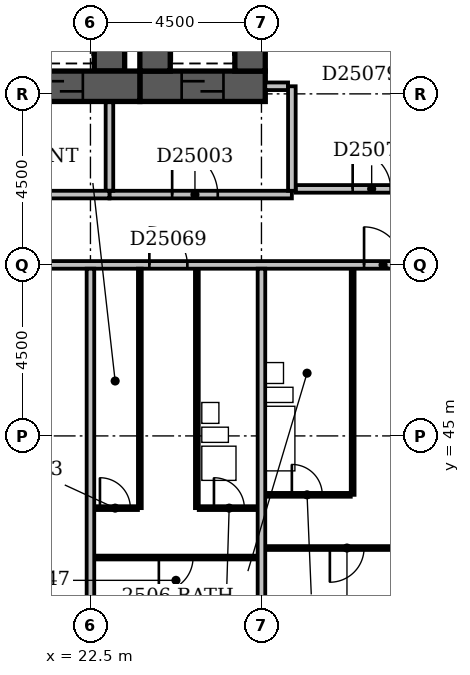
"""IFC4 building model, lengths in metres.
Left out: names, types, materials, properties, quantities, classifications, styles, units other than length and angle.
Written with IfcOpenShell. Run it as: python <this file> out.ifc"""

import sys

from ifc_helpers import new_model, si_unit, direction, frame, frame_2d, origin, place, context, subcontext, project, spatial, rectangle, extrude, element, fill, save


model = new_model("IFC4")
c1 = context("Model", 3, precision=1e-05, world=origin(), true_north=direction((0.0, 1.0)))
c2 = subcontext(c1, "Body", "Model", "MODEL_VIEW")
j1 = project(units=[si_unit("LENGTHUNIT", "METRE"), si_unit("PLANEANGLEUNIT", "RADIAN")], contexts=[c1])
p1 = place(None, origin())
s1 = spatial("IfcSite", under=j1, at=p1, CompositionType="ELEMENT")
p2 = place(p1, origin())
s2 = spatial("IfcBuilding", under=s1, at=p2, CompositionType="ELEMENT")
p3 = place(p2, frame((0.0, 0.0, 101.0)))
s3 = spatial("IfcBuildingStorey", under=s2, at=p3, CompositionType="ELEMENT", Elevation=101.0)
p4 = place(p3, frame((7.35, 54.2, -0.3), z_axis=(0.0, 0.0, 1.0), x_axis=(1.0, 0.0, 0.0)))
e1 = element("IfcWall", 1, at=p4, inside=s3, PredefinedType="SHEAR", context=c2, shape_type="SweptSolid", body=[
    extrude(rectangle(XDim=16.45, YDim=0.8, at=frame_2d((8.225, 0.0))), origin(), (0.0, 0.0, 1.0), 3.6),
])
p5 = place(p4, frame((1.35, 0.0, 0.3)))
e2 = element("IfcOpeningElement", 2, at=p5, cuts=e1, PredefinedType="OPENING", context=c2, shape_type="SweptSolid", body=[
    extrude(rectangle(XDim=1.1, YDim=2.1, at=frame_2d((0.55, 1.05))), frame((0.0, 0.412, 0.0), z_axis=(0.0, -1.0, 0.0), x_axis=(1.0, 0.0, 0.0)), (0.0, 0.0, 1.0), 0.824),
])
p6 = place(p4, frame((3.85, 0.0, 0.3)))
e3 = element("IfcOpeningElement", 3, at=p6, cuts=e1, PredefinedType="OPENING", context=c2, shape_type="SweptSolid", body=[
    extrude(rectangle(XDim=1.1, YDim=2.1, at=frame_2d((0.55, 1.05))), frame((0.0, 0.412, 0.0), z_axis=(0.0, -1.0, 0.0), x_axis=(1.0, 0.0, 0.0)), (0.0, 0.0, 1.0), 0.824),
])
p7 = place(p4, frame((6.35, 0.0, 0.3)))
e4 = element("IfcOpeningElement", 4, at=p7, cuts=e1, PredefinedType="OPENING", context=c2, shape_type="SweptSolid", body=[
    extrude(rectangle(XDim=1.1, YDim=2.1, at=frame_2d((0.55, 1.05))), frame((0.0, 0.412, 0.0), z_axis=(0.0, -1.0, 0.0), x_axis=(1.0, 0.0, 0.0)), (0.0, 0.0, 1.0), 0.824),
])
p8 = place(p4, frame((8.85, 0.0, 0.3)))
e5 = element("IfcOpeningElement", 5, at=p8, cuts=e1, PredefinedType="OPENING", context=c2, shape_type="SweptSolid", body=[
    extrude(rectangle(XDim=1.1, YDim=2.1, at=frame_2d((0.55, 1.05))), frame((0.0, 0.412, 0.0), z_axis=(0.0, -1.0, 0.0), x_axis=(1.0, 0.0, 0.0)), (0.0, 0.0, 1.0), 0.824),
])
p9 = place(p4, frame((11.35, 0.0, 0.3)))
e6 = element("IfcOpeningElement", 6, at=p9, cuts=e1, PredefinedType="OPENING", context=c2, shape_type="SweptSolid", body=[
    extrude(rectangle(XDim=1.1, YDim=2.1, at=frame_2d((0.55, 1.05))), frame((0.0, 0.412, 0.0), z_axis=(0.0, -1.0, 0.0), x_axis=(1.0, 0.0, 0.0)), (0.0, 0.0, 1.0), 0.824),
])
p10 = place(p4, frame((13.85, 0.0, 0.3)))
e7 = element("IfcOpeningElement", 7, at=p10, cuts=e1, PredefinedType="OPENING", context=c2, shape_type="SweptSolid", body=[
    extrude(rectangle(XDim=1.1, YDim=2.1, at=frame_2d((0.55, 1.05))), frame((0.0, 0.412, 0.0), z_axis=(0.0, -1.0, 0.0), x_axis=(1.0, 0.0, 0.0)), (0.0, 0.0, 1.0), 0.824),
])
p11 = place(p3, frame((23.0, 54.6, -0.3), z_axis=(0.0, 0.0, 1.0), x_axis=(0.0, 1.0, 0.0)))
e8 = element("IfcWall", 8, at=p11, inside=s3, PredefinedType="SHEAR", context=c2, shape_type="SweptSolid", body=[
    extrude(rectangle(XDim=3.0, YDim=0.8, at=frame_2d((1.5, 0.0))), origin(), (0.0, 0.0, 1.0), 3.6),
])
p12 = place(p3, frame((23.8, 54.2, -0.3), z_axis=(0.0, 0.0, 1.0), x_axis=(1.0, 0.0, 0.0)))
e9 = element("IfcWall", 9, at=p12, inside=s3, PredefinedType="SHEAR", context=c2, shape_type="SweptSolid", body=[
    extrude(rectangle(XDim=3.3, YDim=0.8, at=frame_2d((1.65, 0.0))), origin(), (0.0, 0.0, 1.0), 3.6),
])
p13 = place(p12, frame((1.1, 0.0, 0.3)))
e10 = element("IfcOpeningElement", 10, at=p13, cuts=e9, PredefinedType="OPENING", context=c2, shape_type="SweptSolid", body=[
    extrude(rectangle(XDim=1.1, YDim=2.1, at=frame_2d((0.55, 1.05))), frame((0.0, 0.412, 0.0), z_axis=(0.0, -1.0, 0.0), x_axis=(1.0, 0.0, 0.0)), (0.0, 0.0, 1.0), 0.824),
])
for number, where, z_axis, x_axis in (
    (11, (24.2, 54.6, -0.3), (0.0, 0.0, 1.0), (0.0, 1.0, 0.0)),
    (12, (26.7, 54.6, -0.3), (0.0, 0.0, 1.0), (0.0, 1.0, 0.0)),
):
    element("IfcWall", number, at=place(p3, frame(where, z_axis=z_axis, x_axis=x_axis)), inside=s3, PredefinedType="SHEAR", context=c2, shape_type="SweptSolid", body=[
        extrude(rectangle(XDim=3.0, YDim=0.8, at=frame_2d((1.5, 0.0))), origin(), (0.0, 0.0, 1.0), 3.6),
    ])
p14 = place(p3, frame((8.0, 51.35, 0.0), z_axis=(0.0, 0.0, 1.0), x_axis=(1.0, 0.0, 0.0)))
e13 = element("IfcWall", 13, at=p14, inside=s3, PredefinedType="PARTITIONING", context=c2, shape_type="SweptSolid", body=[
    extrude(rectangle(XDim=15.0, YDim=0.2, at=frame_2d((7.5, 0.0))), origin(), (0.0, 0.0, 1.0), 3.3),
])
p15 = place(p14, frame((3.4, 0.0, 0.0)))
e14 = element("IfcOpeningElement", 14, at=p15, cuts=e13, PredefinedType="OPENING", context=c2, shape_type="SweptSolid", body=[
    extrude(rectangle(XDim=1.2, YDim=2.1, at=frame_2d((0.6, 1.05))), frame((0.0, 0.112, 0.0), z_axis=(0.0, -1.0, 0.0), x_axis=(1.0, 0.0, 0.0)), (0.0, 0.0, 1.0), 0.224),
])
p16 = place(p14, frame((9.4, 0.0, 0.0)))
e15 = element("IfcOpeningElement", 15, at=p16, cuts=e13, PredefinedType="OPENING", context=c2, shape_type="SweptSolid", body=[
    extrude(rectangle(XDim=1.2, YDim=2.1, at=frame_2d((0.6, 1.05))), frame((0.0, 0.112, 0.0), z_axis=(0.0, -1.0, 0.0), x_axis=(1.0, 0.0, 0.0)), (0.0, 0.0, 1.0), 0.224),
])
p17 = place(p3, frame((23.0, 51.45, 0.0), z_axis=(0.0, 0.0, 1.0), x_axis=(0.0, 1.0, 0.0)))
e16 = element("IfcWall", 16, at=p17, inside=s3, PredefinedType="PARTITIONING", context=c2, shape_type="SweptSolid", body=[
    extrude(rectangle(XDim=2.33, YDim=0.2, at=frame_2d((1.165, 0.0))), origin(), (0.0, 0.0, 1.0), 3.3),
])
p18 = place(p3, frame((23.0, 51.35, 0.0), z_axis=(0.0, 0.0, 1.0), x_axis=(1.0, 0.0, 0.0)))
e17 = element("IfcWall", 17, at=p18, inside=s3, PredefinedType="PARTITIONING", context=c2, shape_type="SweptSolid", body=[
    extrude(rectangle(XDim=4.8, YDim=0.2, at=frame_2d((2.4, 0.0))), origin(), (0.0, 0.0, 1.0), 3.3),
])
p19 = place(p18, frame((1.65, 0.0, 0.0)))
e18 = element("IfcOpeningElement", 18, at=p19, cuts=e17, PredefinedType="OPENING", context=c2, shape_type="SweptSolid", body=[
    extrude(rectangle(XDim=1.2, YDim=2.1, at=frame_2d((0.6, 1.05))), frame((0.0, 0.112, 0.0), z_axis=(0.0, -1.0, 0.0), x_axis=(1.0, 0.0, 0.0)), (0.0, 0.0, 1.0), 0.224),
])
p20 = place(p3, frame((27.8, 51.45, 0.0), z_axis=(0.0, 0.0, 1.0), x_axis=(0.0, 1.0, 0.0)))
e19 = element("IfcWall", 19, at=p20, inside=s3, PredefinedType="PARTITIONING", context=c2, shape_type="SweptSolid", body=[
    extrude(rectangle(XDim=2.75, YDim=0.2, at=frame_2d((1.375, 0.0))), origin(), (0.0, 0.0, 1.0), 3.3),
])
p21 = place(p3, frame((27.1, 54.2, 0.0), z_axis=(0.0, 0.0, 1.0), x_axis=(1.0, 0.0, 0.0)))
e20 = element("IfcWall", 20, at=p21, inside=s3, PredefinedType="PARTITIONING", context=c2, shape_type="SweptSolid", body=[
    extrude(rectangle(XDim=0.6, YDim=0.2, at=frame_2d((0.3, 0.0))), origin(), (0.0, 0.0, 1.0), 3.3),
])
p22 = place(p3, frame((22.5, 36.6, 0.0), z_axis=(0.0, 0.0, 1.0), x_axis=(0.0, 1.0, 0.0)))
e21 = element("IfcWall", 21, at=p22, inside=s3, PredefinedType="PARTITIONING", context=c2, shape_type="SweptSolid", body=[
    extrude(rectangle(XDim=12.8, YDim=0.2, at=frame_2d((6.4, 0.0))), origin(), (0.0, 0.0, 1.0), 3.3),
])
p23 = place(p3, frame((27.0, 36.6, 0.0), z_axis=(0.0, 0.0, 1.0), x_axis=(0.0, 1.0, 0.0)))
e22 = element("IfcWall", 22, at=p23, inside=s3, PredefinedType="PARTITIONING", context=c2, shape_type="SweptSolid", body=[
    extrude(rectangle(XDim=12.8, YDim=0.2, at=frame_2d((6.4, 0.0))), origin(), (0.0, 0.0, 1.0), 2.6),
])
p24 = place(p3, frame((22.6, 41.8, 0.0), z_axis=(0.0, 0.0, 1.0), x_axis=(1.0, 0.0, 0.0)))
e23 = element("IfcWall", 23, at=p24, inside=s3, PredefinedType="PARTITIONING", context=c2, shape_type="SweptSolid", body=[
    extrude(rectangle(XDim=4.3, YDim=0.1, at=frame_2d((2.15, 0.0))), origin(), (0.0, 0.0, 1.0), 3.3),
])
p25 = place(p24, frame((1.7, 0.0, 0.0)))
e24 = element("IfcOpeningElement", 24, at=p25, cuts=e23, PredefinedType="OPENING", context=c2, shape_type="SweptSolid", body=[
    extrude(rectangle(XDim=0.9, YDim=2.1, at=frame_2d((0.45, 1.05))), frame((0.0, 0.062, 0.0), z_axis=(0.0, -1.0, 0.0), x_axis=(1.0, 0.0, 0.0)), (0.0, 0.0, 1.0), 0.124),
])
p26 = place(p3, frame((27.1, 42.05, 0.0), z_axis=(0.0, 0.0, 1.0), x_axis=(1.0, 0.0, 0.0)))
e25 = element("IfcWall", 25, at=p26, inside=s3, PredefinedType="PARTITIONING", context=c2, shape_type="SweptSolid", body=[
    extrude(rectangle(XDim=8.8, YDim=0.1, at=frame_2d((4.4, 0.0))), origin(), (0.0, 0.0, 1.0), 3.3),
])
p27 = place(p26, frame((1.7, 0.0, 0.0)))
e26 = element("IfcOpeningElement", 26, at=p27, cuts=e25, PredefinedType="OPENING", context=c2, shape_type="SweptSolid", body=[
    extrude(rectangle(XDim=0.9, YDim=2.1, at=frame_2d((0.45, 1.05))), frame((0.0, 0.062, 0.0), z_axis=(0.0, -1.0, 0.0), x_axis=(1.0, 0.0, 0.0)), (0.0, 0.0, 1.0), 0.124),
])
p28 = place(p26, frame((6.2, 0.0, 0.0)))
e27 = element("IfcOpeningElement", 27, at=p28, cuts=e25, PredefinedType="OPENING", context=c2, shape_type="SweptSolid", body=[
    extrude(rectangle(XDim=0.9, YDim=2.1, at=frame_2d((0.45, 1.05))), frame((0.0, 0.062, 0.0), z_axis=(0.0, -1.0, 0.0), x_axis=(1.0, 0.0, 0.0)), (0.0, 0.0, 1.0), 0.124),
])
p29 = place(p3, frame((22.6, 43.1, 0.0), z_axis=(0.0, 0.0, 1.0), x_axis=(1.0, 0.0, 0.0)))
e28 = element("IfcWall", 28, at=p29, inside=s3, PredefinedType="PARTITIONING", context=c2, shape_type="SweptSolid", body=[
    extrude(rectangle(XDim=1.15, YDim=0.1, at=frame_2d((0.575, 0.0))), origin(), (0.0, 0.0, 1.0), 3.3),
])
p30 = place(p29, frame((0.15, 0.0, 0.0)))
e29 = element("IfcOpeningElement", 29, at=p30, cuts=e28, PredefinedType="OPENING", context=c2, shape_type="SweptSolid", body=[
    extrude(rectangle(XDim=0.8, YDim=2.1, at=frame_2d((0.4, 1.05))), frame((0.0, 0.062, 0.0), z_axis=(0.0, -1.0, 0.0), x_axis=(1.0, 0.0, 0.0)), (0.0, 0.0, 1.0), 0.124),
])
p31 = place(p3, frame((23.8, 43.1, 0.0), z_axis=(0.0, 0.0, 1.0), x_axis=(0.0, 1.0, 0.0)))
e30 = element("IfcWall", 30, at=p31, inside=s3, PredefinedType="PARTITIONING", context=c2, shape_type="SweptSolid", body=[
    extrude(rectangle(XDim=6.3, YDim=0.1, at=frame_2d((3.15, 0.0))), origin(), (0.0, 0.0, 1.0), 3.3),
])
p32 = place(p3, frame((25.3, 43.1, 0.0), z_axis=(0.0, 0.0, 1.0), x_axis=(0.0, 1.0, 0.0)))
e31 = element("IfcWall", 31, at=p32, inside=s3, PredefinedType="PLUMBINGWALL", context=c2, shape_type="SweptSolid", body=[
    extrude(rectangle(XDim=6.3, YDim=0.1, at=frame_2d((3.15, 0.0))), origin(), (0.0, 0.0, 1.0), 3.3),
])
p33 = place(p3, frame((25.35, 43.1, 0.0), z_axis=(0.0, 0.0, 1.0), x_axis=(1.0, 0.0, 0.0)))
e32 = element("IfcWall", 32, at=p33, inside=s3, PredefinedType="PARTITIONING", context=c2, shape_type="SweptSolid", body=[
    extrude(rectangle(XDim=1.55, YDim=0.1, at=frame_2d((0.775, 0.0))), origin(), (0.0, 0.0, 1.0), 3.3),
])
p34 = place(p33, frame((0.4, 0.0, 0.0)))
e33 = element("IfcOpeningElement", 33, at=p34, cuts=e32, PredefinedType="OPENING", context=c2, shape_type="SweptSolid", body=[
    extrude(rectangle(XDim=0.8, YDim=2.1, at=frame_2d((0.4, 1.05))), frame((0.0, 0.062, 0.0), z_axis=(0.0, -1.0, 0.0), x_axis=(1.0, 0.0, 0.0)), (0.0, 0.0, 1.0), 0.124),
])
p35 = place(p3, frame((27.1, 43.45, 0.0), z_axis=(0.0, 0.0, 1.0), x_axis=(1.0, 0.0, 0.0)))
e34 = element("IfcWall", 34, at=p35, inside=s3, PredefinedType="PARTITIONING", context=c2, shape_type="SweptSolid", body=[
    extrude(rectangle(XDim=2.25, YDim=0.1, at=frame_2d((1.125, 0.0))), origin(), (0.0, 0.0, 1.0), 3.3),
])
p36 = place(p35, frame((0.7, 0.0, 0.0)))
e35 = element("IfcOpeningElement", 35, at=p36, cuts=e34, PredefinedType="OPENING", context=c2, shape_type="SweptSolid", body=[
    extrude(rectangle(XDim=0.8, YDim=2.1, at=frame_2d((0.4, 1.05))), frame((0.0, 0.062, 0.0), z_axis=(0.0, -1.0, 0.0), x_axis=(1.0, 0.0, 0.0)), (0.0, 0.0, 1.0), 0.124),
])
p37 = place(p3, frame((29.4, 43.45, 0.0), z_axis=(0.0, 0.0, 1.0), x_axis=(0.0, 1.0, 0.0)))
e36 = element("IfcWall", 36, at=p37, inside=s3, PredefinedType="PLUMBINGWALL", context=c2, shape_type="SweptSolid", body=[
    extrude(rectangle(XDim=5.95, YDim=0.1, at=frame_2d((2.975, 0.0))), origin(), (0.0, 0.0, 1.0), 3.3),
])
p38 = place(p3, frame((9.1, 49.5, 0.0), z_axis=(0.0, 0.0, 1.0), x_axis=(1.0, 0.0, 0.0)))
e37 = element("IfcWall", 37, at=p38, inside=s3, PredefinedType="PARTITIONING", context=c2, shape_type="SweptSolid", body=[
    extrude(rectangle(XDim=57.8, YDim=0.2, at=frame_2d((28.9, 0.0))), origin(), (0.0, 0.0, 1.0), 3.3),
])
p39 = place(p38, frame((14.95, 0.0, 0.0)))
e38 = element("IfcOpeningElement", 38, at=p39, cuts=e37, PredefinedType="OPENING", context=c2, shape_type="SweptSolid", body=[
    extrude(rectangle(XDim=1.0, YDim=2.1, at=frame_2d((0.5, 1.05))), frame((0.0, 0.112, 0.0), z_axis=(0.0, -1.0, 0.0), x_axis=(1.0, 0.0, 0.0)), (0.0, 0.0, 1.0), 0.224),
])
p40 = place(p38, frame((20.6, 0.0, 0.0)))
e39 = element("IfcOpeningElement", 39, at=p40, cuts=e37, PredefinedType="OPENING", context=c2, shape_type="SweptSolid", body=[
    extrude(rectangle(XDim=1.0, YDim=2.1, at=frame_2d((0.5, 1.05))), frame((0.0, 0.112, 0.0), z_axis=(0.0, -1.0, 0.0), x_axis=(1.0, 0.0, 0.0)), (0.0, 0.0, 1.0), 0.224),
])
p41 = place(p38, frame((27.2, 0.0, 0.0)))
e40 = element("IfcOpeningElement", 40, at=p41, cuts=e37, PredefinedType="OPENING", context=c2, shape_type="SweptSolid", body=[
    extrude(rectangle(XDim=1.0, YDim=2.1, at=frame_2d((0.5, 1.05))), frame((0.0, 0.112, 0.0), z_axis=(0.0, -1.0, 0.0), x_axis=(1.0, 0.0, 0.0)), (0.0, 0.0, 1.0), 0.224),
])
p42 = place(p38, frame((40.7, 0.0, 0.0)))
e41 = element("IfcOpeningElement", 41, at=p42, cuts=e37, PredefinedType="OPENING", context=c2, shape_type="SweptSolid", body=[
    extrude(rectangle(XDim=1.0, YDim=2.1, at=frame_2d((0.5, 1.05))), frame((0.0, 0.112, 0.0), z_axis=(0.0, -1.0, 0.0), x_axis=(1.0, 0.0, 0.0)), (0.0, 0.0, 1.0), 0.224),
])
p43 = place(p38, frame((10.65, 0.0, 0.0)))
e42 = element("IfcOpeningElement", 42, at=p43, cuts=e37, PredefinedType="OPENING", context=c2, shape_type="SweptSolid", body=[
    extrude(rectangle(XDim=0.9, YDim=2.1, at=frame_2d((0.45, 1.05))), frame((0.0, 0.112, 0.0), z_axis=(0.0, -1.0, 0.0), x_axis=(1.0, 0.0, 0.0)), (0.0, 0.0, 1.0), 0.224),
])
p44 = place(p3, frame((27.9, 51.5, 0.0), z_axis=(0.0, 0.0, 1.0), x_axis=(1.0, 0.0, 0.0)))
e43 = element("IfcWall", 43, at=p44, inside=s3, PredefinedType="PARTITIONING", context=c2, shape_type="SweptSolid", body=[
    extrude(rectangle(XDim=9.3, YDim=0.2, at=frame_2d((4.65, 0.0))), origin(), (0.0, 0.0, 1.0), 3.3),
])
p45 = place(p44, frame((1.5, 0.0, 0.0)))
e44 = element("IfcOpeningElement", 44, at=p45, cuts=e43, PredefinedType="OPENING", context=c2, shape_type="SweptSolid", body=[
    extrude(rectangle(XDim=1.0, YDim=2.1, at=frame_2d((0.5, 1.05))), frame((0.0, 0.112, 0.0), z_axis=(0.0, -1.0, 0.0), x_axis=(1.0, 0.0, 0.0)), (0.0, 0.0, 1.0), 0.224),
])
p46 = place(p44, frame((6.3, 0.0, 0.0)))
e45 = element("IfcOpeningElement", 45, at=p46, cuts=e43, PredefinedType="OPENING", context=c2, shape_type="SweptSolid", body=[
    extrude(rectangle(XDim=0.9, YDim=2.1, at=frame_2d((0.45, 1.05))), frame((0.0, 0.112, 0.0), z_axis=(0.0, -1.0, 0.0), x_axis=(1.0, 0.0, 0.0)), (0.0, 0.0, 1.0), 0.224),
])
p47 = place(p19, origin())
e46 = element("IfcDoor", 46, at=p47, inside=s3, OperationType="SINGLE_SWING_LEFT", PredefinedType="DOOR", context=c2, shape_type="SweptSolid", body=[
    extrude(rectangle(XDim=1.2, YDim=2.1, at=frame_2d((0.6, 1.05))), frame((0.0, 0.025, 0.0), z_axis=(0.0, -1.0, 0.0), x_axis=(1.0, 0.0, 0.0)), (0.0, 0.0, 1.0), 0.05),
])
fill(e18, e46)
p48 = place(p13, origin())
e47 = element("IfcDoor", 47, at=p48, inside=s3, OperationType="SLIDING_TO_LEFT", PredefinedType="DOOR", context=c2, shape_type="SweptSolid", body=[
    extrude(rectangle(XDim=1.1, YDim=2.1, at=frame_2d((0.55, 1.05))), frame((0.0, 0.025, 0.0), z_axis=(0.0, -1.0, 0.0), x_axis=(1.0, 0.0, 0.0)), (0.0, 0.0, 1.0), 0.05),
])
fill(e10, e47)
p49 = place(p10, origin())
e48 = element("IfcDoor", 48, at=p49, inside=s3, OperationType="SLIDING_TO_LEFT", PredefinedType="DOOR", context=c2, shape_type="SweptSolid", body=[
    extrude(rectangle(XDim=1.1, YDim=2.1, at=frame_2d((0.55, 1.05))), frame((0.0, 0.025, 0.0), z_axis=(0.0, -1.0, 0.0), x_axis=(1.0, 0.0, 0.0)), (0.0, 0.0, 1.0), 0.05),
])
fill(e7, e48)
p50 = place(p25, frame((0.9, 0.0, 0.0), z_axis=(0.0, 0.0, 1.0), x_axis=(-1.0, 0.0, 0.0)))
e49 = element("IfcDoor", 49, at=p50, inside=s3, OperationType="SINGLE_SWING_RIGHT", PredefinedType="DOOR", context=c2, shape_type="SweptSolid", body=[
    extrude(rectangle(XDim=0.9, YDim=2.1, at=frame_2d((0.45, 1.05))), frame((0.0, 0.025, 0.0), z_axis=(0.0, -1.0, 0.0), x_axis=(1.0, 0.0, 0.0)), (0.0, 0.0, 1.0), 0.05),
])
fill(e24, e49)
p51 = place(p27, frame((0.9, 0.0, 0.0), z_axis=(0.0, 0.0, 1.0), x_axis=(-1.0, 0.0, 0.0)))
e50 = element("IfcDoor", 50, at=p51, inside=s3, OperationType="SINGLE_SWING_RIGHT", PredefinedType="DOOR", context=c2, shape_type="SweptSolid", body=[
    extrude(rectangle(XDim=0.9, YDim=2.1, at=frame_2d((0.45, 1.05))), frame((0.0, 0.025, 0.0), z_axis=(0.0, -1.0, 0.0), x_axis=(1.0, 0.0, 0.0)), (0.0, 0.0, 1.0), 0.05),
])
fill(e26, e50)
p52 = place(p30, origin())
e51 = element("IfcDoor", 51, at=p52, inside=s3, OperationType="SINGLE_SWING_LEFT", PredefinedType="DOOR", context=c2, shape_type="SweptSolid", body=[
    extrude(rectangle(XDim=0.8, YDim=2.1, at=frame_2d((0.4, 1.05))), frame((0.0, 0.025, 0.0), z_axis=(0.0, -1.0, 0.0), x_axis=(1.0, 0.0, 0.0)), (0.0, 0.0, 1.0), 0.05),
])
fill(e29, e51)
p53 = place(p34, origin())
e52 = element("IfcDoor", 52, at=p53, inside=s3, OperationType="SINGLE_SWING_LEFT", PredefinedType="DOOR", context=c2, shape_type="SweptSolid", body=[
    extrude(rectangle(XDim=0.8, YDim=2.1, at=frame_2d((0.4, 1.05))), frame((0.0, 0.025, 0.0), z_axis=(0.0, -1.0, 0.0), x_axis=(1.0, 0.0, 0.0)), (0.0, 0.0, 1.0), 0.05),
])
fill(e33, e52)
p54 = place(p36, origin())
e53 = element("IfcDoor", 53, at=p54, inside=s3, OperationType="SINGLE_SWING_LEFT", PredefinedType="DOOR", context=c2, shape_type="SweptSolid", body=[
    extrude(rectangle(XDim=0.8, YDim=2.1, at=frame_2d((0.4, 1.05))), frame((0.0, 0.025, 0.0), z_axis=(0.0, -1.0, 0.0), x_axis=(1.0, 0.0, 0.0)), (0.0, 0.0, 1.0), 0.05),
])
fill(e35, e53)
p55 = place(p39, origin())
e54 = element("IfcDoor", 54, at=p55, inside=s3, OperationType="SINGLE_SWING_LEFT", PredefinedType="DOOR", context=c2, shape_type="SweptSolid", body=[
    extrude(rectangle(XDim=1.0, YDim=2.1, at=frame_2d((0.5, 1.05))), frame((0.0, 0.025, 0.0), z_axis=(0.0, -1.0, 0.0), x_axis=(1.0, 0.0, 0.0)), (0.0, 0.0, 1.0), 0.05),
])
fill(e38, e54)
p56 = place(p40, origin())
e55 = element("IfcDoor", 55, at=p56, inside=s3, OperationType="SINGLE_SWING_LEFT", PredefinedType="DOOR", context=c2, shape_type="SweptSolid", body=[
    extrude(rectangle(XDim=1.0, YDim=2.1, at=frame_2d((0.5, 1.05))), frame((0.0, 0.025, 0.0), z_axis=(0.0, -1.0, 0.0), x_axis=(1.0, 0.0, 0.0)), (0.0, 0.0, 1.0), 0.05),
])
fill(e39, e55)
p57 = place(p45, origin())
e56 = element("IfcDoor", 56, at=p57, inside=s3, OperationType="SINGLE_SWING_LEFT", PredefinedType="DOOR", context=c2, shape_type="SweptSolid", body=[
    extrude(rectangle(XDim=1.0, YDim=2.1, at=frame_2d((0.5, 1.05))), frame((0.0, 0.025, 0.0), z_axis=(0.0, -1.0, 0.0), x_axis=(1.0, 0.0, 0.0)), (0.0, 0.0, 1.0), 0.05),
])
fill(e44, e56)
save(model, sys.argv[1])
